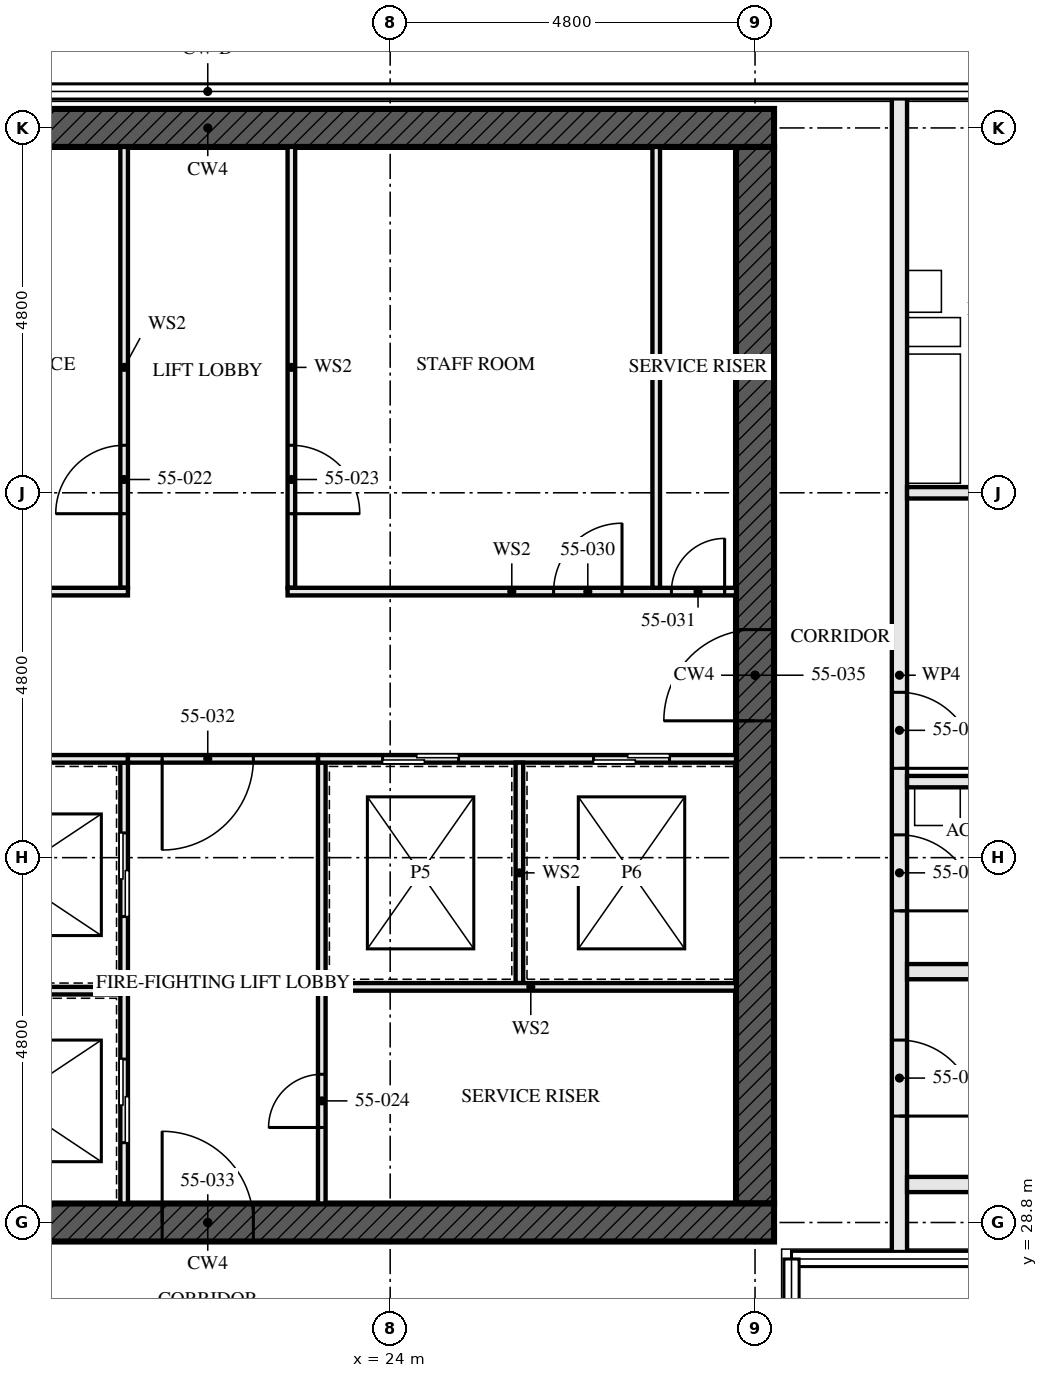
"""IFC4 building model, lengths in metres.
Left out: names, types, materials, properties, quantities, classifications, styles, units other than length and angle.
Written with IfcOpenShell. Run it as: python <this file> out.ifc"""

import sys

from ifc_helpers import new_model, si_unit, direction, frame, frame_2d, origin, place, context, subcontext, project, spatial, rectangle, extrude, element, fill, save


model = new_model("IFC4")
c1 = context("Model", 3, precision=1e-05, world=origin(), true_north=direction((0.0, 1.0)))
c2 = subcontext(c1, "Body", "Model", "MODEL_VIEW")
j1 = project(units=[si_unit("LENGTHUNIT", "METRE"), si_unit("PLANEANGLEUNIT", "RADIAN")], contexts=[c1])
p1 = place(None, origin())
s1 = spatial("IfcSite", under=j1, at=p1, CompositionType="ELEMENT")
p2 = place(p1, origin())
s2 = spatial("IfcBuilding", under=s1, at=p2, CompositionType="ELEMENT")
p3 = place(p2, frame((0.0, 0.0, 201.5)))
s3 = spatial("IfcBuildingStorey", under=s2, at=p3, CompositionType="ELEMENT", Elevation=201.5)
p4 = place(p3, frame((14.15, 28.8, -0.17), z_axis=(0.0, 0.0, 1.0), x_axis=(1.0, 0.0, 0.0)))
e1 = element("IfcWall", 1, at=p4, inside=s3, PredefinedType="SHEAR", context=c2, shape_type="SweptSolid", body=[
    extrude(rectangle(XDim=14.9, YDim=0.5, at=frame_2d((7.45, 0.0))), origin(), (0.0, 0.0, 1.0), 3.5),
])
p5 = place(p4, frame((6.85, 0.0, 0.17)))
e2 = element("IfcOpeningElement", 2, at=p5, cuts=e1, PredefinedType="OPENING", context=c2, shape_type="SweptSolid", body=[
    extrude(rectangle(XDim=1.2, YDim=2.1, at=frame_2d((0.6, 1.05))), frame((0.0, 0.26, 0.0), z_axis=(0.0, -1.0, 0.0), x_axis=(1.0, 0.0, 0.0)), (0.0, 0.0, 1.0), 0.521),
])
p6 = place(p3, frame((29.05, 43.2, -0.17), z_axis=(0.0, 0.0, 1.0), x_axis=(-1.0, 0.0, 0.0)))
e3 = element("IfcWall", 3, at=p6, inside=s3, PredefinedType="SHEAR", context=c2, shape_type="SweptSolid", body=[
    extrude(rectangle(XDim=14.9, YDim=0.5, at=frame_2d((7.45, 0.0))), origin(), (0.0, 0.0, 1.0), 3.5),
])
p7 = place(p3, frame((28.8, 29.05, -0.17), z_axis=(0.0, 0.0, 1.0), x_axis=(0.0, 1.0, 0.0)))
e4 = element("IfcWall", 4, at=p7, inside=s3, PredefinedType="SHEAR", context=c2, shape_type="SweptSolid", body=[
    extrude(rectangle(XDim=13.9, YDim=0.5, at=frame_2d((6.95, 0.0))), origin(), (0.0, 0.0, 1.0), 3.5),
])
p8 = place(p7, frame((6.35, 0.0, 0.17)))
e5 = element("IfcOpeningElement", 5, at=p8, cuts=e4, PredefinedType="OPENING", context=c2, shape_type="SweptSolid", body=[
    extrude(rectangle(XDim=1.2, YDim=2.1, at=frame_2d((0.6, 1.05))), frame((0.0, 0.26, 0.0), z_axis=(0.0, -1.0, 0.0), x_axis=(1.0, 0.0, 0.0)), (0.0, 0.0, 1.0), 0.521),
])
for number, where, z_axis, x_axis in (
    (6, (35.5, 29.3, 0.0), (0.0, 0.0, 1.0), (-1.0, 0.0, 0.0)),
    (7, (35.5, 32.1, 0.0), (0.0, 0.0, 1.0), (-1.0, 0.0, 0.0)),
):
    element("IfcWall", number, at=place(p3, frame(where, z_axis=z_axis, x_axis=x_axis)), inside=s3, PredefinedType="SOLIDWALL", context=c2, shape_type="SweptSolid", body=[
        extrude(rectangle(XDim=4.7, YDim=0.2, at=frame_2d((2.35, 0.0))), origin(), (0.0, 0.0, 1.0), 2.99),
    ])
p9 = place(p3, frame((33.8, 34.6, 0.0), z_axis=(0.0, 0.0, 1.0), x_axis=(-1.0, 0.0, 0.0)))
e8 = element("IfcWall", 8, at=p9, inside=s3, PredefinedType="PARTITIONING", context=c2, shape_type="SweptSolid", body=[
    extrude(rectangle(XDim=3.0, YDim=0.15, at=frame_2d((1.5, 0.0))), origin(), (0.0, 0.0, 1.0), 3.33),
])
p10 = place(p3, frame((33.8, 38.4, 0.0), z_axis=(0.0, 0.0, 1.0), x_axis=(-1.0, 0.0, 0.0)))
e9 = element("IfcWall", 9, at=p10, inside=s3, PredefinedType="PARTITIONING", context=c2, shape_type="SweptSolid", body=[
    extrude(rectangle(XDim=3.0, YDim=0.15, at=frame_2d((1.5, 0.0))), origin(), (0.0, 0.0, 1.0), 2.55),
])
p11 = place(p10, frame((1.05, 0.0, 0.0)))
e10 = element("IfcOpeningElement", 10, at=p11, cuts=e9, PredefinedType="OPENING", context=c2, shape_type="SweptSolid", body=[
    extrude(rectangle(XDim=0.9, YDim=2.1, at=frame_2d((0.45, 1.05))), frame((0.0, 0.085, 0.0), z_axis=(0.0, -1.0, 0.0), x_axis=(1.0, 0.0, 0.0)), (0.0, 0.0, 1.0), 0.171),
])
p12 = place(p3, frame((30.7, 28.345, 0.0), z_axis=(0.0, 0.0, 1.0), x_axis=(0.0, 1.0, 0.0)))
e11 = element("IfcWall", 11, at=p12, inside=s3, PredefinedType="PARTITIONING", context=c2, shape_type="SweptSolid", body=[
    extrude(rectangle(XDim=15.31, YDim=0.2, at=frame_2d((7.655, 0.0))), origin(), (0.0, 0.0, 1.0), 2.32),
])
p13 = place(p12, frame((1.855, 0.0, 0.0)))
e12 = element("IfcOpeningElement", 12, at=p13, cuts=e11, PredefinedType="OPENING", context=c2, shape_type="SweptSolid", body=[
    extrude(rectangle(XDim=1.0, YDim=2.1, at=frame_2d((0.5, 1.05))), frame((0.0, 0.111, 0.0), z_axis=(0.0, -1.0, 0.0), x_axis=(1.0, 0.0, 0.0)), (0.0, 0.0, 1.0), 0.221),
])
p14 = place(p12, frame((4.555, 0.0, 0.0)))
e13 = element("IfcOpeningElement", 13, at=p14, cuts=e11, PredefinedType="OPENING", context=c2, shape_type="SweptSolid", body=[
    extrude(rectangle(XDim=1.0, YDim=2.1, at=frame_2d((0.5, 1.05))), frame((0.0, 0.111, 0.0), z_axis=(0.0, -1.0, 0.0), x_axis=(1.0, 0.0, 0.0)), (0.0, 0.0, 1.0), 0.221),
])
p15 = place(p12, frame((6.43, 0.0, 0.0)))
e14 = element("IfcOpeningElement", 14, at=p15, cuts=e11, PredefinedType="OPENING", context=c2, shape_type="SweptSolid", body=[
    extrude(rectangle(XDim=1.0, YDim=2.1, at=frame_2d((0.5, 1.05))), frame((0.0, 0.111, 0.0), z_axis=(0.0, -1.0, 0.0), x_axis=(1.0, 0.0, 0.0)), (0.0, 0.0, 1.0), 0.221),
])
p16 = place(p3, frame((27.5, 37.15, 0.0), z_axis=(0.0, 0.0, 1.0), x_axis=(0.0, 1.0, 0.0)))
e15 = element("IfcWall", 15, at=p16, inside=s3, PredefinedType="SOLIDWALL", context=c2, shape_type="SweptSolid", body=[
    extrude(rectangle(XDim=5.8, YDim=0.1, at=frame_2d((2.9, 0.0))), origin(), (0.0, 0.0, 1.0), 3.33),
])
p17 = place(p3, frame((20.5, 29.05, 0.0), z_axis=(0.0, 0.0, 1.0), x_axis=(0.0, 1.0, 0.0)))
e16 = element("IfcWall", 16, at=p17, inside=s3, PredefinedType="SOLIDWALL", context=c2, shape_type="SweptSolid", body=[
    extrude(rectangle(XDim=5.8, YDim=0.1, at=frame_2d((2.9, 0.0))), origin(), (0.0, 0.0, 1.0), 3.33),
])
p18 = place(p17, frame((0.8, 0.0, 0.0)))
e17 = element("IfcOpeningElement", 17, at=p18, cuts=e16, PredefinedType="OPENING", context=c2, shape_type="SweptSolid", body=[
    extrude(rectangle(XDim=1.1, YDim=2.3, at=frame_2d((0.55, 1.15))), frame((0.0, 0.061, 0.0), z_axis=(0.0, -1.0, 0.0), x_axis=(1.0, 0.0, 0.0)), (0.0, 0.0, 1.0), 0.121),
])
p19 = place(p17, frame((3.775, 0.0, 0.0)))
e18 = element("IfcOpeningElement", 18, at=p19, cuts=e16, PredefinedType="OPENING", context=c2, shape_type="SweptSolid", body=[
    extrude(rectangle(XDim=1.1, YDim=2.3, at=frame_2d((0.55, 1.15))), frame((0.0, 0.061, 0.0), z_axis=(0.0, -1.0, 0.0), x_axis=(1.0, 0.0, 0.0)), (0.0, 0.0, 1.0), 0.121),
])
p20 = place(p3, frame((20.5, 37.15, 0.0), z_axis=(0.0, 0.0, 1.0), x_axis=(0.0, 1.0, 0.0)))
e19 = element("IfcWall", 19, at=p20, inside=s3, PredefinedType="SOLIDWALL", context=c2, shape_type="SweptSolid", body=[
    extrude(rectangle(XDim=5.8, YDim=0.1, at=frame_2d((2.9, 0.0))), origin(), (0.0, 0.0, 1.0), 3.33),
])
p21 = place(p20, frame((0.975, 0.0, 0.0)))
e20 = element("IfcOpeningElement", 20, at=p21, cuts=e19, PredefinedType="OPENING", context=c2, shape_type="SweptSolid", body=[
    extrude(rectangle(XDim=0.9, YDim=2.1, at=frame_2d((0.45, 1.05))), frame((0.0, 0.061, 0.0), z_axis=(0.0, -1.0, 0.0), x_axis=(1.0, 0.0, 0.0)), (0.0, 0.0, 1.0), 0.121),
])
p22 = place(p3, frame((22.7, 37.15, 0.0), z_axis=(0.0, 0.0, 1.0), x_axis=(0.0, 1.0, 0.0)))
e21 = element("IfcWall", 21, at=p22, inside=s3, PredefinedType="SOLIDWALL", context=c2, shape_type="SweptSolid", body=[
    extrude(rectangle(XDim=5.8, YDim=0.1, at=frame_2d((2.9, 0.0))), origin(), (0.0, 0.0, 1.0), 3.33),
])
p23 = place(p22, frame((0.975, 0.0, 0.0)))
e22 = element("IfcOpeningElement", 22, at=p23, cuts=e21, PredefinedType="OPENING", context=c2, shape_type="SweptSolid", body=[
    extrude(rectangle(XDim=0.9, YDim=2.1, at=frame_2d((0.45, 1.05))), frame((0.0, 0.061, 0.0), z_axis=(0.0, -1.0, 0.0), x_axis=(1.0, 0.0, 0.0)), (0.0, 0.0, 1.0), 0.121),
])
p24 = place(p3, frame((23.1, 29.05, 0.0), z_axis=(0.0, 0.0, 1.0), x_axis=(0.0, 1.0, 0.0)))
e23 = element("IfcWall", 23, at=p24, inside=s3, PredefinedType="SOLIDWALL", context=c2, shape_type="SweptSolid", body=[
    extrude(rectangle(XDim=5.8, YDim=0.1, at=frame_2d((2.9, 0.0))), origin(), (0.0, 0.0, 1.0), 3.33),
])
p25 = place(p24, frame((1.0, 0.0, 0.0)))
e24 = element("IfcOpeningElement", 24, at=p25, cuts=e23, PredefinedType="OPENING", context=c2, shape_type="SweptSolid", body=[
    extrude(rectangle(XDim=0.7, YDim=2.1, at=frame_2d((0.35, 1.05))), frame((0.0, 0.061, 0.0), z_axis=(0.0, -1.0, 0.0), x_axis=(1.0, 0.0, 0.0)), (0.0, 0.0, 1.0), 0.121),
])
p26 = place(p3, frame((14.65, 34.9, 0.0), z_axis=(0.0, 0.0, 1.0), x_axis=(1.0, 0.0, 0.0)))
e25 = element("IfcWall", 25, at=p26, inside=s3, PredefinedType="SOLIDWALL", context=c2, shape_type="SweptSolid", body=[
    extrude(rectangle(XDim=5.9, YDim=0.1, at=frame_2d((2.95, 0.0))), origin(), (0.0, 0.0, 1.0), 3.33),
])
p27 = place(p26, frame((1.6, 0.0, 0.0)))
e26 = element("IfcOpeningElement", 26, at=p27, cuts=e25, PredefinedType="OPENING", context=c2, shape_type="SweptSolid", body=[
    extrude(rectangle(XDim=0.7, YDim=2.1, at=frame_2d((0.35, 1.05))), frame((0.0, 0.061, 0.0), z_axis=(0.0, -1.0, 0.0), x_axis=(1.0, 0.0, 0.0)), (0.0, 0.0, 1.0), 0.121),
])
p28 = place(p3, frame((23.05, 34.9, 0.0), z_axis=(0.0, 0.0, 1.0), x_axis=(1.0, 0.0, 0.0)))
e27 = element("IfcWall", 27, at=p28, inside=s3, PredefinedType="SOLIDWALL", context=c2, shape_type="SweptSolid", body=[
    extrude(rectangle(XDim=5.5, YDim=0.1, at=frame_2d((2.75, 0.0))), origin(), (0.0, 0.0, 1.0), 3.33),
])
p29 = place(p28, frame((0.85, 0.0, 0.0)))
e28 = element("IfcOpeningElement", 28, at=p29, cuts=e27, PredefinedType="OPENING", context=c2, shape_type="SweptSolid", body=[
    extrude(rectangle(XDim=1.0, YDim=2.1, at=frame_2d((0.5, 1.05))), frame((0.0, 0.061, 0.0), z_axis=(0.0, -1.0, 0.0), x_axis=(1.0, 0.0, 0.0)), (0.0, 0.0, 1.0), 0.121),
])
p30 = place(p28, frame((3.625, 0.0, 0.0)))
e29 = element("IfcOpeningElement", 29, at=p30, cuts=e27, PredefinedType="OPENING", context=c2, shape_type="SweptSolid", body=[
    extrude(rectangle(XDim=1.0, YDim=2.1, at=frame_2d((0.5, 1.05))), frame((0.0, 0.061, 0.0), z_axis=(0.0, -1.0, 0.0), x_axis=(1.0, 0.0, 0.0)), (0.0, 0.0, 1.0), 0.121),
])
p31 = place(p3, frame((14.65, 37.1, 0.0), z_axis=(0.0, 0.0, 1.0), x_axis=(1.0, 0.0, 0.0)))
e30 = element("IfcWall", 30, at=p31, inside=s3, PredefinedType="SOLIDWALL", context=c2, shape_type="SweptSolid", body=[
    extrude(rectangle(XDim=5.9, YDim=0.1, at=frame_2d((2.95, 0.0))), origin(), (0.0, 0.0, 1.0), 3.33),
])
p32 = place(p31, frame((0.5, 0.0, 0.0)))
e31 = element("IfcOpeningElement", 31, at=p32, cuts=e30, PredefinedType="OPENING", context=c2, shape_type="SweptSolid", body=[
    extrude(rectangle(XDim=0.7, YDim=2.1, at=frame_2d((0.35, 1.05))), frame((0.0, 0.061, 0.0), z_axis=(0.0, -1.0, 0.0), x_axis=(1.0, 0.0, 0.0)), (0.0, 0.0, 1.0), 0.121),
])
p33 = place(p31, frame((1.9, 0.0, 0.0)))
e32 = element("IfcOpeningElement", 32, at=p33, cuts=e30, PredefinedType="OPENING", context=c2, shape_type="SweptSolid", body=[
    extrude(rectangle(XDim=0.9, YDim=2.1, at=frame_2d((0.45, 1.05))), frame((0.0, 0.061, 0.0), z_axis=(0.0, -1.0, 0.0), x_axis=(1.0, 0.0, 0.0)), (0.0, 0.0, 1.0), 0.121),
])
p34 = place(p3, frame((22.65, 37.1, 0.0), z_axis=(0.0, 0.0, 1.0), x_axis=(1.0, 0.0, 0.0)))
e33 = element("IfcWall", 33, at=p34, inside=s3, PredefinedType="SOLIDWALL", context=c2, shape_type="SweptSolid", body=[
    extrude(rectangle(XDim=5.9, YDim=0.1, at=frame_2d((2.95, 0.0))), origin(), (0.0, 0.0, 1.0), 3.33),
])
p35 = place(p34, frame((3.5, 0.0, 0.0)))
e34 = element("IfcOpeningElement", 34, at=p35, cuts=e33, PredefinedType="OPENING", context=c2, shape_type="SweptSolid", body=[
    extrude(rectangle(XDim=0.9, YDim=2.1, at=frame_2d((0.45, 1.05))), frame((0.0, 0.061, 0.0), z_axis=(0.0, -1.0, 0.0), x_axis=(1.0, 0.0, 0.0)), (0.0, 0.0, 1.0), 0.121),
])
p36 = place(p34, frame((5.05, 0.0, 0.0)))
e35 = element("IfcOpeningElement", 35, at=p36, cuts=e33, PredefinedType="OPENING", context=c2, shape_type="SweptSolid", body=[
    extrude(rectangle(XDim=0.7, YDim=2.1, at=frame_2d((0.35, 1.05))), frame((0.0, 0.061, 0.0), z_axis=(0.0, -1.0, 0.0), x_axis=(1.0, 0.0, 0.0)), (0.0, 0.0, 1.0), 0.121),
])
p37 = place(p3, frame((20.55, 34.9, 0.0), z_axis=(0.0, 0.0, 1.0), x_axis=(1.0, 0.0, 0.0)))
e36 = element("IfcWall", 36, at=p37, inside=s3, PredefinedType="SOLIDWALL", context=c2, shape_type="SweptSolid", body=[
    extrude(rectangle(XDim=2.5, YDim=0.1, at=frame_2d((1.25, 0.0))), origin(), (0.0, 0.0, 1.0), 3.33),
])
p38 = place(p37, frame((0.45, 0.0, 0.0)))
e37 = element("IfcOpeningElement", 37, at=p38, cuts=e36, PredefinedType="OPENING", context=c2, shape_type="SweptSolid", body=[
    extrude(rectangle(XDim=1.2, YDim=2.1, at=frame_2d((0.6, 1.05))), frame((0.0, 0.061, 0.0), z_axis=(0.0, -1.0, 0.0), x_axis=(1.0, 0.0, 0.0)), (0.0, 0.0, 1.0), 0.121),
])
p39 = place(p3, frame((17.55, 31.85, 0.0), z_axis=(0.0, 0.0, 1.0), x_axis=(1.0, 0.0, 0.0)))
e38 = element("IfcWall", 38, at=p39, inside=s3, PredefinedType="SOLIDWALL", context=c2, shape_type="SweptSolid", body=[
    extrude(rectangle(XDim=2.9, YDim=0.1, at=frame_2d((1.45, 0.0))), origin(), (0.0, 0.0, 1.0), 3.33),
])
p40 = place(p3, frame((25.7, 31.95, 0.0), z_axis=(0.0, 0.0, 1.0), x_axis=(0.0, 1.0, 0.0)))
e39 = element("IfcWall", 39, at=p40, inside=s3, PredefinedType="SOLIDWALL", context=c2, shape_type="SweptSolid", body=[
    extrude(rectangle(XDim=2.9, YDim=0.1, at=frame_2d((1.45, 0.0))), origin(), (0.0, 0.0, 1.0), 3.33),
])
p41 = place(p3, frame((23.15, 31.9, 0.0), z_axis=(0.0, 0.0, 1.0), x_axis=(1.0, 0.0, 0.0)))
e40 = element("IfcWall", 40, at=p41, inside=s3, PredefinedType="SOLIDWALL", context=c2, shape_type="SweptSolid", body=[
    extrude(rectangle(XDim=5.4, YDim=0.1, at=frame_2d((2.7, 0.0))), origin(), (0.0, 0.0, 1.0), 3.33),
])
p42 = place(p13, frame((1.0, 0.0, 0.0), z_axis=(0.0, 0.0, 1.0), x_axis=(-1.0, 0.0, 0.0)))
e41 = element("IfcDoor", 41, at=p42, inside=s3, OperationType="SINGLE_SWING_LEFT", PredefinedType="DOOR", context=c2, shape_type="SweptSolid", body=[
    extrude(rectangle(XDim=1.0, YDim=2.1, at=frame_2d((0.5, 1.05))), frame((0.0, 0.032, 0.0), z_axis=(0.0, -1.0, 0.0), x_axis=(1.0, 0.0, 0.0)), (0.0, 0.0, 1.0), 0.064),
])
fill(e12, e41)
p43 = place(p14, frame((1.0, 0.0, 0.0), z_axis=(0.0, 0.0, 1.0), x_axis=(-1.0, 0.0, 0.0)))
e42 = element("IfcDoor", 42, at=p43, inside=s3, OperationType="SINGLE_SWING_LEFT", PredefinedType="DOOR", context=c2, shape_type="SweptSolid", body=[
    extrude(rectangle(XDim=1.0, YDim=2.1, at=frame_2d((0.5, 1.05))), frame((0.0, 0.027, 0.0), z_axis=(0.0, -1.0, 0.0), x_axis=(1.0, 0.0, 0.0)), (0.0, 0.0, 1.0), 0.054),
])
fill(e13, e42)
p44 = place(p15, frame((1.0, 0.0, 0.0), z_axis=(0.0, 0.0, 1.0), x_axis=(-1.0, 0.0, 0.0)))
e43 = element("IfcDoor", 43, at=p44, inside=s3, OperationType="SINGLE_SWING_LEFT", PredefinedType="DOOR", context=c2, shape_type="SweptSolid", body=[
    extrude(rectangle(XDim=1.0, YDim=2.1, at=frame_2d((0.5, 1.05))), frame((0.0, 0.027, 0.0), z_axis=(0.0, -1.0, 0.0), x_axis=(1.0, 0.0, 0.0)), (0.0, 0.0, 1.0), 0.054),
])
fill(e14, e43)
p45 = place(p18, origin())
e44 = element("IfcDoor", 44, at=p45, inside=s3, OperationType="SLIDING_TO_LEFT", PredefinedType="DOOR", context=c2, shape_type="SweptSolid", body=[
    extrude(rectangle(XDim=1.1, YDim=2.3, at=frame_2d((0.55, 1.15))), frame((0.0, 0.05, 0.0), z_axis=(0.0, -1.0, 0.0), x_axis=(1.0, 0.0, 0.0)), (0.0, 0.0, 1.0), 0.1),
])
fill(e17, e44)
p46 = place(p19, origin())
e45 = element("IfcDoor", 45, at=p46, inside=s3, OperationType="SLIDING_TO_LEFT", PredefinedType="DOOR", context=c2, shape_type="SweptSolid", body=[
    extrude(rectangle(XDim=1.1, YDim=2.3, at=frame_2d((0.55, 1.15))), frame((0.0, 0.05, 0.0), z_axis=(0.0, -1.0, 0.0), x_axis=(1.0, 0.0, 0.0)), (0.0, 0.0, 1.0), 0.1),
])
fill(e18, e45)
p47 = place(p21, origin())
e46 = element("IfcDoor", 46, at=p47, inside=s3, OperationType="SINGLE_SWING_RIGHT", PredefinedType="DOOR", context=c2, shape_type="SweptSolid", body=[
    extrude(rectangle(XDim=0.9, YDim=2.1, at=frame_2d((0.45, 1.05))), frame((0.0, 0.027, 0.0), z_axis=(0.0, -1.0, 0.0), x_axis=(1.0, 0.0, 0.0)), (0.0, 0.0, 1.0), 0.054),
])
fill(e20, e46)
p48 = place(p23, frame((0.9, 0.0, 0.0), z_axis=(0.0, 0.0, 1.0), x_axis=(-1.0, 0.0, 0.0)))
e47 = element("IfcDoor", 47, at=p48, inside=s3, OperationType="SINGLE_SWING_LEFT", PredefinedType="DOOR", context=c2, shape_type="SweptSolid", body=[
    extrude(rectangle(XDim=0.9, YDim=2.1, at=frame_2d((0.45, 1.05))), frame((0.0, 0.027, 0.0), z_axis=(0.0, -1.0, 0.0), x_axis=(1.0, 0.0, 0.0)), (0.0, 0.0, 1.0), 0.054),
])
fill(e22, e47)
p49 = place(p25, origin())
e48 = element("IfcDoor", 48, at=p49, inside=s3, OperationType="SINGLE_SWING_RIGHT", PredefinedType="DOOR", context=c2, shape_type="SweptSolid", body=[
    extrude(rectangle(XDim=0.7, YDim=2.1, at=frame_2d((0.35, 1.05))), frame((0.0, 0.027, 0.0), z_axis=(0.0, -1.0, 0.0), x_axis=(1.0, 0.0, 0.0)), (0.0, 0.0, 1.0), 0.054),
])
fill(e24, e48)
p50 = place(p29, origin())
e49 = element("IfcDoor", 49, at=p50, inside=s3, OperationType="SLIDING_TO_LEFT", PredefinedType="DOOR", context=c2, shape_type="SweptSolid", body=[
    extrude(rectangle(XDim=1.0, YDim=2.1, at=frame_2d((0.5, 1.05))), frame((0.0, 0.05, 0.0), z_axis=(0.0, -1.0, 0.0), x_axis=(1.0, 0.0, 0.0)), (0.0, 0.0, 1.0), 0.1),
])
fill(e28, e49)
p51 = place(p30, origin())
e50 = element("IfcDoor", 50, at=p51, inside=s3, OperationType="SLIDING_TO_LEFT", PredefinedType="DOOR", context=c2, shape_type="SweptSolid", body=[
    extrude(rectangle(XDim=1.0, YDim=2.1, at=frame_2d((0.5, 1.05))), frame((0.0, 0.05, 0.0), z_axis=(0.0, -1.0, 0.0), x_axis=(1.0, 0.0, 0.0)), (0.0, 0.0, 1.0), 0.1),
])
fill(e29, e50)
p52 = place(p35, origin())
e51 = element("IfcDoor", 51, at=p52, inside=s3, OperationType="SINGLE_SWING_LEFT", PredefinedType="DOOR", context=c2, shape_type="SweptSolid", body=[
    extrude(rectangle(XDim=0.9, YDim=2.1, at=frame_2d((0.45, 1.05))), frame((0.0, 0.027, 0.0), z_axis=(0.0, -1.0, 0.0), x_axis=(1.0, 0.0, 0.0)), (0.0, 0.0, 1.0), 0.054),
])
fill(e34, e51)
p53 = place(p36, origin())
e52 = element("IfcDoor", 52, at=p53, inside=s3, OperationType="SINGLE_SWING_LEFT", PredefinedType="DOOR", context=c2, shape_type="SweptSolid", body=[
    extrude(rectangle(XDim=0.7, YDim=2.1, at=frame_2d((0.35, 1.05))), frame((0.0, 0.027, 0.0), z_axis=(0.0, -1.0, 0.0), x_axis=(1.0, 0.0, 0.0)), (0.0, 0.0, 1.0), 0.054),
])
fill(e35, e52)
p54 = place(p38, frame((1.2, 0.0, 0.0), z_axis=(0.0, 0.0, 1.0), x_axis=(-1.0, 0.0, 0.0)))
e53 = element("IfcDoor", 53, at=p54, inside=s3, OperationType="SINGLE_SWING_LEFT", PredefinedType="DOOR", context=c2, shape_type="SweptSolid", body=[
    extrude(rectangle(XDim=1.2, YDim=2.1, at=frame_2d((0.6, 1.05))), frame((0.0, 0.027, 0.0), z_axis=(0.0, -1.0, 0.0), x_axis=(1.0, 0.0, 0.0)), (0.0, 0.0, 1.0), 0.054),
])
fill(e37, e53)
p55 = place(p5, origin())
e54 = element("IfcDoor", 54, at=p55, inside=s3, OperationType="SINGLE_SWING_LEFT", PredefinedType="DOOR", context=c2, shape_type="SweptSolid", body=[
    extrude(rectangle(XDim=1.2, YDim=2.1, at=frame_2d((0.6, 1.05))), frame((0.0, 0.027, 0.0), z_axis=(0.0, -1.0, 0.0), x_axis=(1.0, 0.0, 0.0)), (0.0, 0.0, 1.0), 0.054),
])
fill(e2, e54)
p56 = place(p8, origin())
e55 = element("IfcDoor", 55, at=p56, inside=s3, OperationType="SINGLE_SWING_LEFT", PredefinedType="DOOR", context=c2, shape_type="SweptSolid", body=[
    extrude(rectangle(XDim=1.2, YDim=2.1, at=frame_2d((0.6, 1.05))), frame((0.0, 0.027, 0.0), z_axis=(0.0, -1.0, 0.0), x_axis=(1.0, 0.0, 0.0)), (0.0, 0.0, 1.0), 0.054),
])
fill(e5, e55)
save(model, sys.argv[1])
